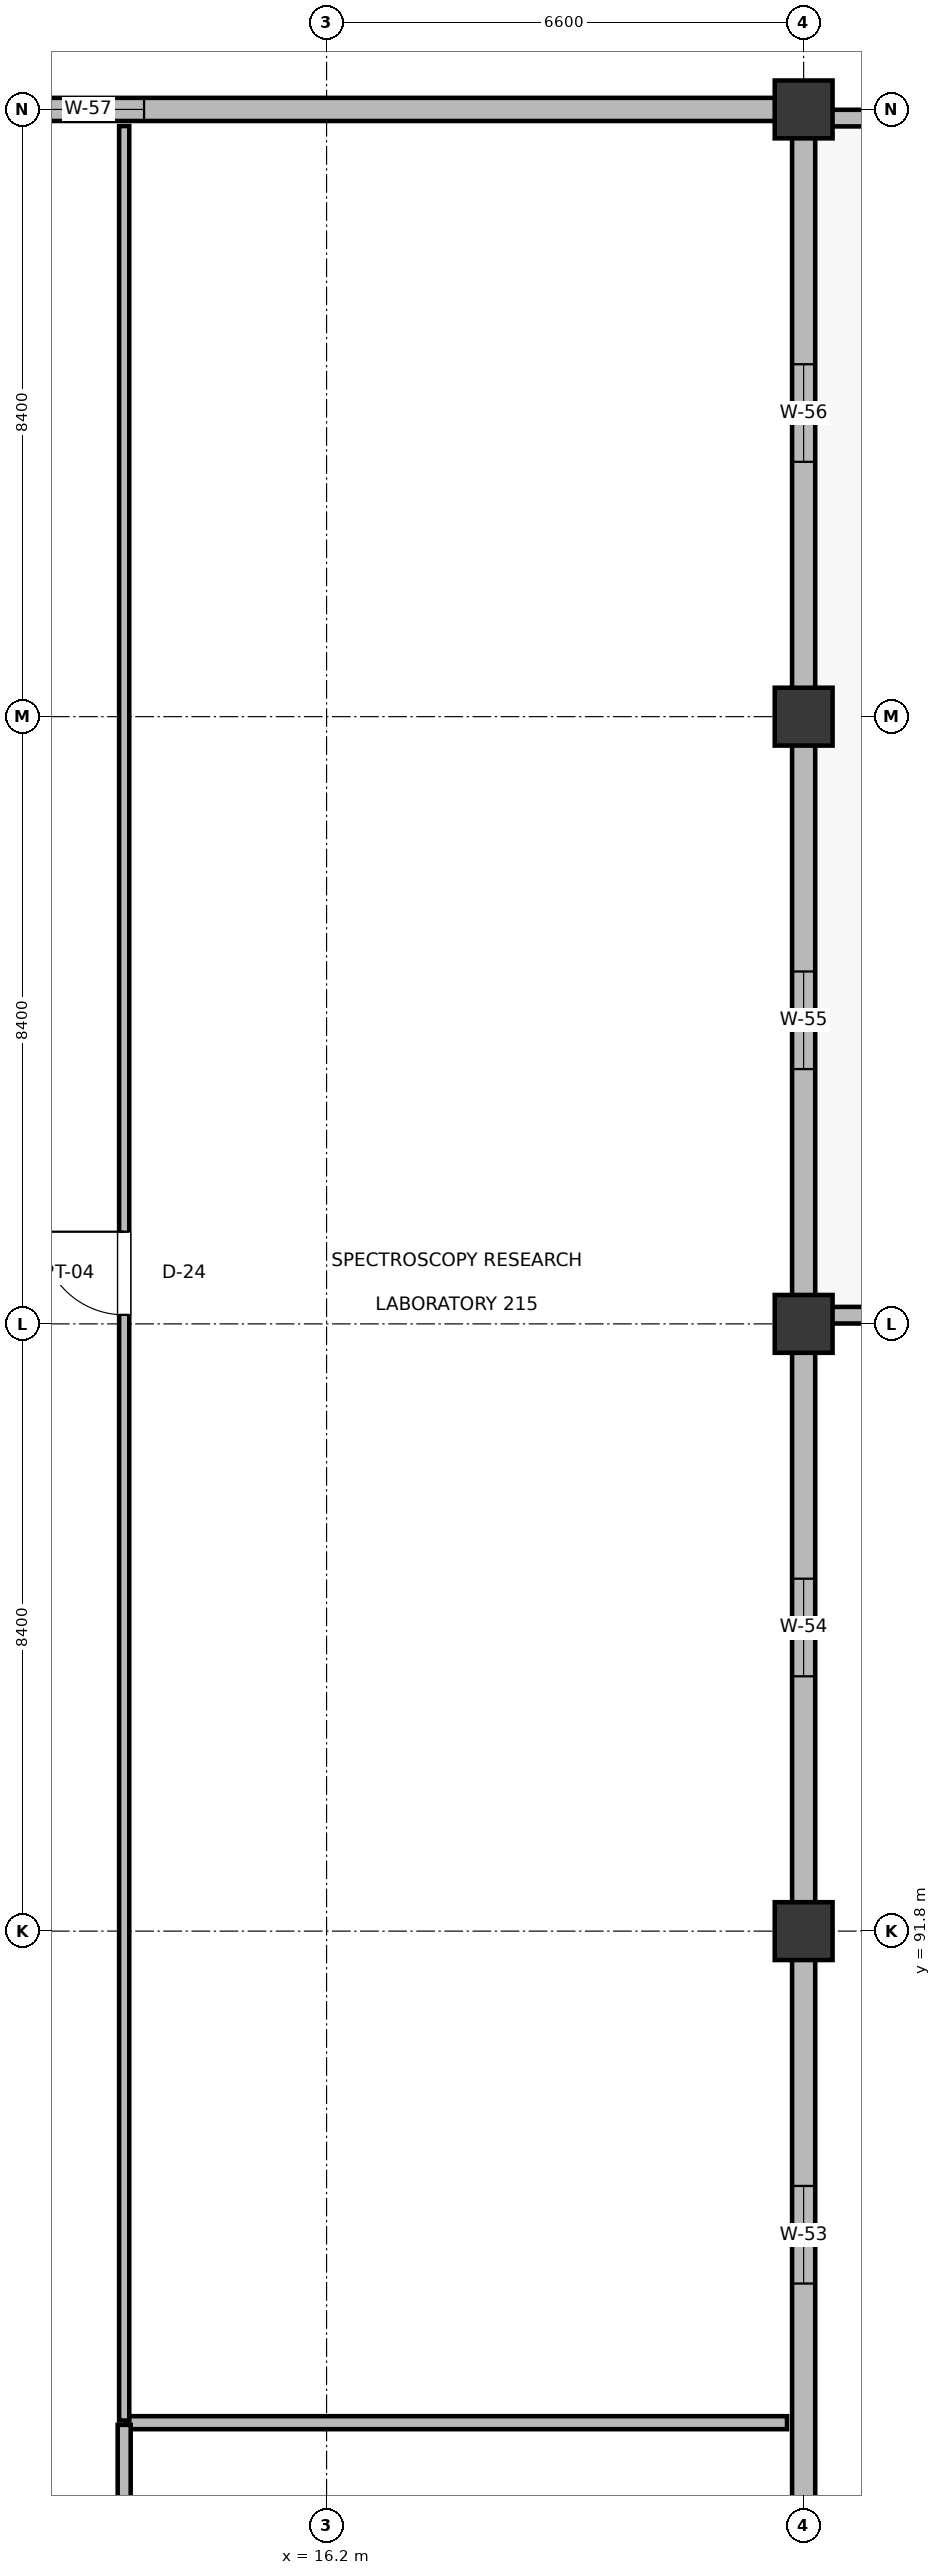
"""IFC4 building model, lengths in metres.
Left out: names, types, materials, properties, quantities, classifications, styles, units other than length and angle.
Written with IfcOpenShell. Run it as: python <this file> out.ifc"""

import sys

from ifc_helpers import new_model, si_unit, direction, frame, frame_2d, origin, origin_2d, place, context, subcontext, project, spatial, rectangle, extrude, element, fill, save


model = new_model("IFC4")
c1 = context("Model", 3, precision=1e-05, world=origin(), true_north=direction((0.0, 1.0)))
c2 = subcontext(c1, "Body", "Model", "MODEL_VIEW")
j1 = project(units=[si_unit("LENGTHUNIT", "METRE"), si_unit("PLANEANGLEUNIT", "RADIAN")], contexts=[c1])
p1 = place(None, origin())
s1 = spatial("IfcSite", under=j1, at=p1, CompositionType="ELEMENT")
p2 = place(p1, origin())
s2 = spatial("IfcBuilding", under=s1, at=p2, CompositionType="ELEMENT")
p3 = place(p2, frame((0.0, 0.0, 10.2)))
s3 = spatial("IfcBuildingStorey", under=s2, at=p3, CompositionType="ELEMENT", Elevation=10.2)
for number, where, z_axis, x_axis in (
    (1, (22.8, 91.8, 0.0), (0.0, 0.0, 1.0), (1.0, 0.0, 0.0)),
    (2, (22.8, 100.2, 0.0), (0.0, 0.0, 1.0), (1.0, 0.0, 0.0)),
    (3, (22.8, 108.6, 0.0), (0.0, 0.0, 1.0), (1.0, 0.0, 0.0)),
    (4, (22.8, 117.0, 0.0), (0.0, 0.0, 1.0), (1.0, 0.0, 0.0)),
):
    element("IfcColumn", number, at=place(p3, frame(where, z_axis=z_axis, x_axis=x_axis)), inside=s3, PredefinedType="COLUMN", context=c2, shape_type="SweptSolid", body=[
        extrude(rectangle(XDim=0.8, YDim=0.8, at=origin_2d()), origin(), (0.0, 0.0, 1.0), 4.8),
    ])
p4 = place(p3, frame((22.8, 83.785, 0.0), z_axis=(0.0, 0.0, 1.0), x_axis=(0.0, 1.0, 0.0)))
e5 = element("IfcWall", 5, at=p4, inside=s3, PredefinedType="SOLIDWALL", context=c2, shape_type="SweptSolid", body=[
    extrude(rectangle(XDim=7.63, YDim=0.32, at=frame_2d((3.815, 0.0))), origin(), (0.0, 0.0, 1.0), 3.825),
])
p5 = place(p4, frame((3.14, 0.0, 0.9)))
e6 = element("IfcOpeningElement", 6, at=p5, cuts=e5, PredefinedType="OPENING", context=c2, shape_type="SweptSolid", body=[
    extrude(rectangle(XDim=1.35, YDim=1.15, at=frame_2d((0.675, 0.575))), frame((0.0, 0.17, 0.0), z_axis=(0.0, -1.0, 0.0), x_axis=(1.0, 0.0, 0.0)), (0.0, 0.0, 1.0), 0.34),
])
p6 = place(p3, frame((22.8, 92.185, 0.0), z_axis=(0.0, 0.0, 1.0), x_axis=(0.0, 1.0, 0.0)))
e7 = element("IfcWall", 7, at=p6, inside=s3, PredefinedType="SOLIDWALL", context=c2, shape_type="SweptSolid", body=[
    extrude(rectangle(XDim=7.63, YDim=0.32, at=frame_2d((3.815, 0.0))), origin(), (0.0, 0.0, 1.0), 3.825),
])
p7 = place(p6, frame((3.14, 0.0, 0.9)))
e8 = element("IfcOpeningElement", 8, at=p7, cuts=e7, PredefinedType="OPENING", context=c2, shape_type="SweptSolid", body=[
    extrude(rectangle(XDim=1.35, YDim=1.35, at=frame_2d((0.675, 0.675))), frame((0.0, 0.17, 0.0), z_axis=(0.0, -1.0, 0.0), x_axis=(1.0, 0.0, 0.0)), (0.0, 0.0, 1.0), 0.34),
])
p8 = place(p3, frame((22.8, 100.585, 0.0), z_axis=(0.0, 0.0, 1.0), x_axis=(0.0, 1.0, 0.0)))
e9 = element("IfcWall", 9, at=p8, inside=s3, PredefinedType="SOLIDWALL", context=c2, shape_type="SweptSolid", body=[
    extrude(rectangle(XDim=7.63, YDim=0.32, at=frame_2d((3.815, 0.0))), origin(), (0.0, 0.0, 1.0), 3.825),
])
p9 = place(p8, frame((3.14, 0.0, 0.9)))
e10 = element("IfcOpeningElement", 10, at=p9, cuts=e9, PredefinedType="OPENING", context=c2, shape_type="SweptSolid", body=[
    extrude(rectangle(XDim=1.35, YDim=1.55, at=frame_2d((0.675, 0.775))), frame((0.0, 0.17, 0.0), z_axis=(0.0, -1.0, 0.0), x_axis=(1.0, 0.0, 0.0)), (0.0, 0.0, 1.0), 0.34),
])
p10 = place(p3, frame((22.8, 108.985, 0.0), z_axis=(0.0, 0.0, 1.0), x_axis=(0.0, 1.0, 0.0)))
e11 = element("IfcWall", 11, at=p10, inside=s3, PredefinedType="SOLIDWALL", context=c2, shape_type="SweptSolid", body=[
    extrude(rectangle(XDim=7.63, YDim=0.32, at=frame_2d((3.815, 0.0))), origin(), (0.0, 0.0, 1.0), 3.825),
])
p11 = place(p10, frame((3.14, 0.0, 0.9)))
e12 = element("IfcOpeningElement", 12, at=p11, cuts=e11, PredefinedType="OPENING", context=c2, shape_type="SweptSolid", body=[
    extrude(rectangle(XDim=1.35, YDim=1.75, at=frame_2d((0.675, 0.875))), frame((0.0, 0.17, 0.0), z_axis=(0.0, -1.0, 0.0), x_axis=(1.0, 0.0, 0.0)), (0.0, 0.0, 1.0), 0.34),
])
p12 = place(p3, frame((3.385, 117.0, 0.0), z_axis=(0.0, 0.0, 1.0), x_axis=(1.0, 0.0, 0.0)))
e13 = element("IfcWall", 13, at=p12, inside=s3, PredefinedType="SOLIDWALL", context=c2, shape_type="SweptSolid", body=[
    extrude(rectangle(XDim=19.03, YDim=0.32, at=frame_2d((9.515, 0.0))), origin(), (0.0, 0.0, 1.0), 3.775),
])
p13 = place(p12, frame((8.74, 0.0, 0.95)))
e14 = element("IfcOpeningElement", 14, at=p13, cuts=e13, PredefinedType="OPENING", context=c2, shape_type="SweptSolid", body=[
    extrude(rectangle(XDim=1.55, YDim=1.15, at=frame_2d((0.775, 0.575))), frame((0.0, 0.17, 0.0), z_axis=(0.0, -1.0, 0.0), x_axis=(1.0, 0.0, 0.0)), (0.0, 0.0, 1.0), 0.34),
])
for number, where, z_axis, x_axis in (
    (15, (22.92, 100.32, 0.0), (0.0, 0.0, 1.0), (1.0, 0.0, 0.0)),
    (16, (22.92, 116.88, 0.0), (0.0, 0.0, 1.0), (1.0, 0.0, 0.0)),
):
    element("IfcWall", number, at=place(p3, frame(where, z_axis=z_axis, x_axis=x_axis)), inside=s3, PredefinedType="PARAPET", context=c2, shape_type="SweptSolid", body=[
        extrude(rectangle(XDim=61.56, YDim=0.23, at=frame_2d((30.78, 0.0))), origin(), (0.0, 0.0, 1.0), 1.05),
    ])
p14 = place(p3, frame((13.43, 85.0, 0.0), z_axis=(0.0, 0.0, 1.0), x_axis=(1.0, 0.0, 0.0)))
e17 = element("IfcWall", 17, at=p14, inside=s3, PredefinedType="PARTITIONING", context=c2, shape_type="SweptSolid", body=[
    extrude(rectangle(XDim=9.14, YDim=0.18, at=frame_2d((4.57, 0.0))), origin(), (0.0, 0.0, 1.0), 3.825),
])
p15 = place(p3, frame((13.4, 73.853, 0.0), z_axis=(0.0, 0.0, 1.0), x_axis=(0.0, 1.0, 0.0)))
e18 = element("IfcWall", 18, at=p15, inside=s3, PredefinedType="PARTITIONING", context=c2, shape_type="SweptSolid", body=[
    extrude(rectangle(XDim=11.117, YDim=0.18, at=frame_2d((5.558, 0.0))), origin(), (0.0, 0.0, 1.0), 3.515),
])
p16 = place(p15, frame((5.033, 0.0, 0.0)))
e19 = element("IfcOpeningElement", 19, at=p16, cuts=e18, PredefinedType="OPENING", context=c2, shape_type="SweptSolid", body=[
    extrude(rectangle(XDim=1.05, YDim=2.2, at=frame_2d((0.525, 1.1))), frame((0.0, 0.1, 0.0), z_axis=(0.0, -1.0, 0.0), x_axis=(1.0, 0.0, 0.0)), (0.0, 0.0, 1.0), 0.2),
])
p17 = place(p3, frame((13.4, 85.03, 0.0), z_axis=(0.0, 0.0, 1.0), x_axis=(0.0, 1.0, 0.0)))
e20 = element("IfcWall", 20, at=p17, inside=s3, PredefinedType="PARTITIONING", context=c2, shape_type="SweptSolid", body=[
    extrude(rectangle(XDim=31.74, YDim=0.14, at=frame_2d((15.87, 0.0))), origin(), (0.0, 0.0, 1.0), 3.455),
])
p18 = place(p17, frame((15.295, 0.0, 0.0)))
e21 = element("IfcOpeningElement", 21, at=p18, cuts=e20, PredefinedType="OPENING", context=c2, shape_type="SweptSolid", body=[
    extrude(rectangle(XDim=1.15, YDim=2.15, at=frame_2d((0.575, 1.075))), frame((0.0, 0.08, 0.0), z_axis=(0.0, -1.0, 0.0), x_axis=(1.0, 0.0, 0.0)), (0.0, 0.0, 1.0), 0.16),
])
p19 = place(p5, frame((1.35, 0.0, 0.0), z_axis=(0.0, 0.0, 1.0), x_axis=(-1.0, 0.0, 0.0)))
e22 = element("IfcWindow", 22, at=p19, inside=s3, PartitioningType="DOUBLE_PANEL_VERTICAL", PredefinedType="WINDOW", context=c2, shape_type="SweptSolid", body=[
    extrude(rectangle(XDim=1.35, YDim=1.15, at=frame_2d((0.675, 0.575))), frame((0.0, 0.03, 0.0), z_axis=(0.0, -1.0, 0.0), x_axis=(1.0, 0.0, 0.0)), (0.0, 0.0, 1.0), 0.06),
])
fill(e6, e22)
p20 = place(p7, frame((1.35, 0.0, 0.0), z_axis=(0.0, 0.0, 1.0), x_axis=(-1.0, 0.0, 0.0)))
e23 = element("IfcWindow", 23, at=p20, inside=s3, PartitioningType="DOUBLE_PANEL_VERTICAL", PredefinedType="WINDOW", context=c2, shape_type="SweptSolid", body=[
    extrude(rectangle(XDim=1.35, YDim=1.35, at=frame_2d((0.675, 0.675))), frame((0.0, 0.03, 0.0), z_axis=(0.0, -1.0, 0.0), x_axis=(1.0, 0.0, 0.0)), (0.0, 0.0, 1.0), 0.06),
])
fill(e8, e23)
p21 = place(p9, frame((1.35, 0.0, 0.0), z_axis=(0.0, 0.0, 1.0), x_axis=(-1.0, 0.0, 0.0)))
e24 = element("IfcWindow", 24, at=p21, inside=s3, PartitioningType="DOUBLE_PANEL_VERTICAL", PredefinedType="WINDOW", context=c2, shape_type="SweptSolid", body=[
    extrude(rectangle(XDim=1.35, YDim=1.55, at=frame_2d((0.675, 0.775))), frame((0.0, 0.03, 0.0), z_axis=(0.0, -1.0, 0.0), x_axis=(1.0, 0.0, 0.0)), (0.0, 0.0, 1.0), 0.06),
])
fill(e10, e24)
p22 = place(p11, frame((1.35, 0.0, 0.0), z_axis=(0.0, 0.0, 1.0), x_axis=(-1.0, 0.0, 0.0)))
e25 = element("IfcWindow", 25, at=p22, inside=s3, PartitioningType="DOUBLE_PANEL_VERTICAL", PredefinedType="WINDOW", context=c2, shape_type="SweptSolid", body=[
    extrude(rectangle(XDim=1.35, YDim=1.75, at=frame_2d((0.675, 0.875))), frame((0.0, 0.03, 0.0), z_axis=(0.0, -1.0, 0.0), x_axis=(1.0, 0.0, 0.0)), (0.0, 0.0, 1.0), 0.06),
])
fill(e12, e25)
p23 = place(p13, origin())
e26 = element("IfcWindow", 26, at=p23, inside=s3, PartitioningType="DOUBLE_PANEL_VERTICAL", PredefinedType="WINDOW", context=c2, shape_type="SweptSolid", body=[
    extrude(rectangle(XDim=1.55, YDim=1.15, at=frame_2d((0.775, 0.575))), frame((0.0, 0.03, 0.0), z_axis=(0.0, -1.0, 0.0), x_axis=(1.0, 0.0, 0.0)), (0.0, 0.0, 1.0), 0.06),
])
fill(e14, e26)
p24 = place(p18, origin())
e27 = element("IfcDoor", 27, at=p24, inside=s3, OperationType="SINGLE_SWING_RIGHT", PredefinedType="DOOR", context=c2, shape_type="SweptSolid", body=[
    extrude(rectangle(XDim=1.15, YDim=2.15, at=frame_2d((0.575, 1.075))), frame((0.0, 0.025, 0.0), z_axis=(0.0, -1.0, 0.0), x_axis=(1.0, 0.0, 0.0)), (0.0, 0.0, 1.0), 0.05),
])
fill(e21, e27)
save(model, sys.argv[1])
